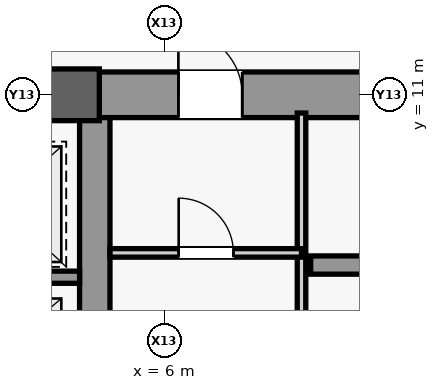
"""IFC4 building model, lengths in metres.
Left out: names, types, materials, properties, quantities, classifications, styles, units other than length and angle.
Written with IfcOpenShell. Run it as: python <this file> out.ifc"""

import sys

from ifc_helpers import new_model, si_unit, direction, frame, frame_2d, origin, origin_2d, place, context, subcontext, project, spatial, rectangle, extrude, source, transform, mapped, element, fill, save


model = new_model("IFC4")
c1 = context("Model", 3, precision=1e-05, world=origin(), true_north=direction((0.0, 1.0)))
c2 = subcontext(c1, "Body", "Model", "MODEL_VIEW")
j1 = project(units=[si_unit("LENGTHUNIT", "METRE"), si_unit("PLANEANGLEUNIT", "RADIAN")], contexts=[c1])
p1 = place(None, origin())
s1 = spatial("IfcSite", under=j1, at=p1, CompositionType="ELEMENT")
p2 = place(p1, origin())
s2 = spatial("IfcBuilding", under=s1, at=p2, CompositionType="ELEMENT")
p3 = place(p2, frame((0.0, 0.0, 144.7)))
s3 = spatial("IfcBuildingStorey", under=s2, at=p3, CompositionType="ELEMENT", Elevation=144.7)
m1 = source(origin(), c2, "Body", "SweptSolid", [
    extrude(rectangle(XDim=21.4, YDim=0.5, at=frame_2d((10.7, 0.0))), origin(), (0.0, 0.0, 1.0), 4.6),
])
p4 = place(p3, frame((4.85, -10.7, 0.0), z_axis=(0.0, 0.0, 1.0), x_axis=(0.0, 1.0, 0.0)))
e1 = element("IfcWall", 1, at=p4, inside=s3, PredefinedType="SHEAR", context=c2, shape_type="MappedRepresentation", body=[
    mapped(m1, transform((0.0, 0.0, 0.0), scale=1.0)),
])
m2 = source(origin(), c2, "Body", "SweptSolid", [
    extrude(rectangle(XDim=5.85, YDim=0.75, at=frame_2d((2.925, 0.0))), origin(), (0.0, 0.0, 1.0), 4.6),
])
p5 = place(p3, frame((4.85, 11.0, 0.0), z_axis=(0.0, 0.0, 1.0), x_axis=(1.0, 0.0, 0.0)))
e2 = element("IfcWall", 2, at=p5, inside=s3, PredefinedType="SHEAR", context=c2, shape_type="MappedRepresentation", body=[
    mapped(m2, transform((0.0, 0.0, 0.0), scale=1.0)),
])
m3 = source(origin(), c2, "Body", "SweptSolid", [
    extrude(rectangle(XDim=1.05, YDim=2.2, at=frame_2d((0.525, 1.1))), frame((0.0, 0.385, 0.0), z_axis=(0.0, -1.0, 0.0), x_axis=(1.0, 0.0, 0.0)), (0.0, 0.0, 1.0), 0.77),
])
p6 = place(p5, frame((1.375, 0.0, 0.0)))
e3 = element("IfcOpeningElement", 3, at=p6, cuts=e2, PredefinedType="OPENING", context=c2, shape_type="MappedRepresentation", body=[
    mapped(m3, transform((0.0, 0.0, 0.0), scale=1.0)),
])
m4 = source(origin(), c2, "Body", "SweptSolid", [
    extrude(rectangle(XDim=9.2, YDim=0.5, at=frame_2d((4.6, 0.0))), origin(), (0.0, 0.0, 1.0), 4.6),
])
p7 = place(p3, frame((-4.6, 11.0, 0.0), z_axis=(0.0, 0.0, 1.0), x_axis=(1.0, 0.0, 0.0)))
e4 = element("IfcWall", 4, at=p7, inside=s3, PredefinedType="SHEAR", context=c2, shape_type="MappedRepresentation", body=[
    mapped(m4, transform((0.0, 0.0, 0.0), scale=1.0)),
])
m5 = source(origin(), c2, "Body", "SweptSolid", [
    extrude(rectangle(XDim=1.8, YDim=2.25, at=frame_2d((0.9, 1.125))), frame((0.0, 0.26, 0.0), z_axis=(0.0, -1.0, 0.0), x_axis=(1.0, 0.0, 0.0)), (0.0, 0.0, 1.0), 0.52),
])
p8 = place(p7, frame((3.7, 0.0, 0.0)))
e5 = element("IfcOpeningElement", 5, at=p8, cuts=e4, PredefinedType="OPENING", context=c2, shape_type="MappedRepresentation", body=[
    mapped(m5, transform((0.0, 0.0, 0.0), scale=1.0)),
])
m6 = source(origin(), c2, "Body", "SweptSolid", [
    extrude(rectangle(XDim=0.85, YDim=0.85, at=origin_2d()), origin(), (0.0, 0.0, 1.0), 5.2),
])
p9 = place(p3, frame((4.5, 11.0, 0.0), z_axis=(0.0, 0.0, 1.0), x_axis=(1.0, 0.0, 0.0)))
e6 = element("IfcColumn", 6, at=p9, inside=s3, PredefinedType="COLUMN", context=c2, shape_type="MappedRepresentation", body=[
    mapped(m6, transform((0.0, 0.0, 0.0), scale=1.0)),
])
m7 = source(origin(), c2, "Body", "SweptSolid", [
    extrude(rectangle(XDim=2.3, YDim=0.3, at=frame_2d((1.15, 0.0))), origin(), (0.0, 0.0, 1.0), 4.6),
])
p10 = place(p3, frame((8.4, 8.2, 0.0), z_axis=(0.0, 0.0, 1.0), x_axis=(1.0, 0.0, 0.0)))
e7 = element("IfcWall", 7, at=p10, inside=s3, PredefinedType="SHEAR", context=c2, shape_type="MappedRepresentation", body=[
    mapped(m7, transform((0.0, 0.0, 0.0), scale=1.0)),
])
m8 = source(origin(), c2, "Body", "SweptSolid", [
    extrude(rectangle(XDim=9.4, YDim=0.14, at=frame_2d((4.7, 0.0))), origin(), (0.0, 0.0, 1.0), 4.6),
])
p11 = place(p3, frame((8.25, 1.3, 0.0), z_axis=(0.0, 0.0, 1.0), x_axis=(0.0, 1.0, 0.0)))
e8 = element("IfcWall", 8, at=p11, inside=s3, PredefinedType="PARTITIONING", context=c2, shape_type="MappedRepresentation", body=[
    mapped(m8, transform((0.0, 0.0, 0.0), scale=1.0)),
])
m9 = source(origin(), c2, "Body", "SweptSolid", [
    extrude(rectangle(XDim=3.15, YDim=0.14, at=frame_2d((1.575, 0.0))), origin(), (0.0, 0.0, 1.0), 4.6),
])
p12 = place(p3, frame((5.1, 8.4, 0.0), z_axis=(0.0, 0.0, 1.0), x_axis=(1.0, 0.0, 0.0)))
e9 = element("IfcWall", 9, at=p12, inside=s3, PredefinedType="PARTITIONING", context=c2, shape_type="MappedRepresentation", body=[
    mapped(m9, transform((0.0, 0.0, 0.0), scale=1.0)),
])
m10 = source(origin(), c2, "Body", "SweptSolid", [
    extrude(rectangle(XDim=0.9, YDim=2.15, at=frame_2d((0.45, 1.075))), frame((0.0, 0.08, 0.0), z_axis=(0.0, -1.0, 0.0), x_axis=(1.0, 0.0, 0.0)), (0.0, 0.0, 1.0), 0.16),
])
p13 = place(p12, frame((1.13, 0.0, 0.0)))
e10 = element("IfcOpeningElement", 10, at=p13, cuts=e9, PredefinedType="OPENING", context=c2, shape_type="MappedRepresentation", body=[
    mapped(m10, transform((0.0, 0.0, 0.0), scale=1.0)),
])
m11 = source(origin(), c2, "Body", "SweptSolid", [
    extrude(rectangle(XDim=2.45, YDim=0.2, at=frame_2d((1.225, 0.0))), origin(), (0.0, 0.0, 1.0), 4.6),
])
p14 = place(p3, frame((2.15, 8.0, 0.0), z_axis=(0.0, 0.0, 1.0), x_axis=(1.0, 0.0, 0.0)))
e11 = element("IfcWall", 11, at=p14, inside=s3, PredefinedType="SHEAR", context=c2, shape_type="MappedRepresentation", body=[
    mapped(m11, transform((0.0, 0.0, 0.0), scale=1.0)),
])
m12 = source(origin(), c2, "Body", "SweptSolid", [
    extrude(rectangle(XDim=1.05, YDim=2.2, at=frame_2d((0.525, 1.1))), frame((0.0, 0.025, 0.0), z_axis=(0.0, -1.0, 0.0), x_axis=(1.0, 0.0, 0.0)), (0.0, 0.0, 1.0), 0.05),
])
p15 = place(p6, origin())
e12 = element("IfcDoor", 12, at=p15, inside=s3, OperationType="SINGLE_SWING_LEFT", PredefinedType="DOOR", context=c2, shape_type="MappedRepresentation", body=[
    mapped(m12, transform((0.0, 0.0, 0.0), scale=1.0)),
])
fill(e3, e12)
m13 = source(origin(), c2, "Body", "SweptSolid", [
    extrude(rectangle(XDim=0.9, YDim=2.15, at=frame_2d((0.45, 1.075))), frame((0.0, 0.025, 0.0), z_axis=(0.0, -1.0, 0.0), x_axis=(1.0, 0.0, 0.0)), (0.0, 0.0, 1.0), 0.05),
])
p16 = place(p13, origin())
e13 = element("IfcDoor", 13, at=p16, inside=s3, OperationType="SINGLE_SWING_LEFT", PredefinedType="DOOR", context=c2, shape_type="MappedRepresentation", body=[
    mapped(m13, transform((0.0, 0.0, 0.0), scale=1.0)),
])
fill(e10, e13)
save(model, sys.argv[1])
